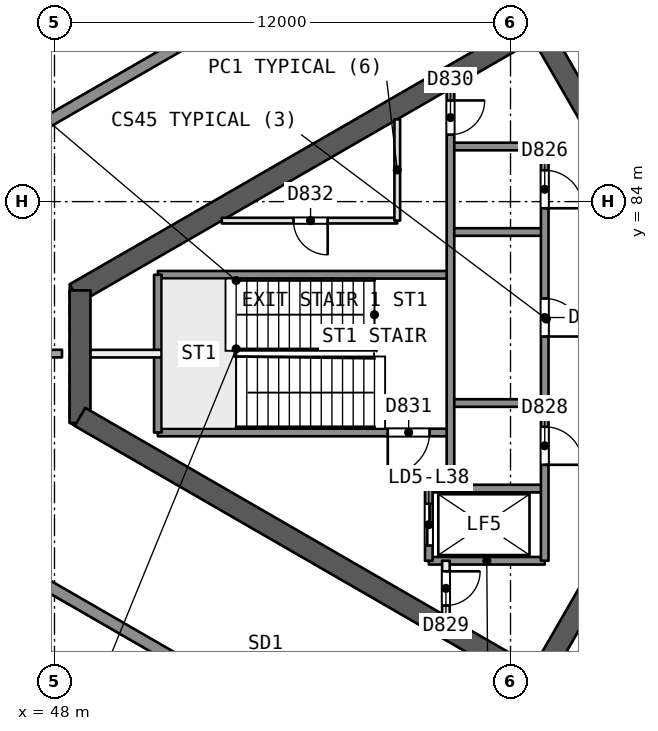
"""IFC4 building model, lengths in metres.
Left out: names, types, materials, properties, quantities, classifications, styles, units other than length and angle.
Written with IfcOpenShell. Run it as: python <this file> out.ifc"""

import sys

from ifc_helpers import new_model, si_unit, direction, frame, frame_2d, origin, place, context, subcontext, project, spatial, rectangle, extrude, element, fill, save


model = new_model("IFC4")
c1 = context("Model", 3, precision=1e-05, world=origin(), true_north=direction((0.0, 1.0)))
c2 = subcontext(c1, "Body", "Model", "MODEL_VIEW")
j1 = project(units=[si_unit("LENGTHUNIT", "METRE"), si_unit("PLANEANGLEUNIT", "RADIAN")], contexts=[c1])
p1 = place(None, origin())
s1 = spatial("IfcSite", under=j1, at=p1, CompositionType="ELEMENT")
p2 = place(p1, origin())
s2 = spatial("IfcBuilding", under=s1, at=p2, CompositionType="ELEMENT")
p3 = place(p2, frame((0.0, 0.0, 160.0)))
s3 = spatial("IfcBuildingStorey", under=s2, at=p3, CompositionType="ELEMENT", Elevation=160.0)
p4 = place(p3, frame((65.682, 80.0, 0.0), z_axis=(0.0, 0.0, 1.0), x_axis=(-0.500000202252, 0.866025287014, 0.0)))
e1 = element("IfcWall", 1, at=p4, inside=s3, PredefinedType="SHEAR", context=c2, shape_type="SweptSolid", body=[
    extrude(rectangle(XDim=10.221, YDim=0.55, at=frame_2d((5.111, 0.0))), origin(), (0.0, 0.0, 1.0), 3.7),
])
p5 = place(p4, frame((0.791, 0.0, 0.0)))
e2 = element("IfcOpeningElement", 2, at=p5, cuts=e1, PredefinedType="OPENING", context=c2, shape_type="SweptSolid", body=[
    extrude(rectangle(XDim=1.2, YDim=2.1, at=frame_2d((0.6, 1.05))), frame((0.0, 0.286, 0.0), z_axis=(0.0, -1.0, 0.0), x_axis=(1.0, 0.0, 0.0)), (0.0, 0.0, 1.0), 0.571),
])
p6 = place(p3, frame((60.709, 88.614, 0.0), z_axis=(0.0, 0.0, 1.0), x_axis=(-0.866020164116, -0.500009075263, 0.0)))
e3 = element("IfcWall", 3, at=p6, inside=s3, PredefinedType="SHEAR", context=c2, shape_type="SweptSolid", body=[
    extrude(rectangle(XDim=14.058, YDim=0.55, at=frame_2d((7.029, 0.0))), origin(), (0.0, 0.0, 1.0), 3.7),
])
p7 = place(p3, frame((48.672, 81.664, 0.0), z_axis=(0.0, 0.0, 1.0), x_axis=(0.0, -1.0, 0.0)))
e4 = element("IfcWall", 4, at=p7, inside=s3, PredefinedType="SHEAR", context=c2, shape_type="SweptSolid", body=[
    extrude(rectangle(XDim=3.487, YDim=0.55, at=frame_2d((1.743, 0.0))), origin(), (0.0, 0.0, 1.0), 3.7),
])
p8 = place(p3, frame((48.672, 78.336, 0.0), z_axis=(0.0, 0.0, 1.0), x_axis=(0.866023530946, -0.500003243837, 0.0)))
e5 = element("IfcWall", 5, at=p8, inside=s3, PredefinedType="SHEAR", context=c2, shape_type="SweptSolid", body=[
    extrude(rectangle(XDim=14.175, YDim=0.55, at=frame_2d((7.087, 0.0))), origin(), (0.0, 0.0, 1.0), 3.7),
])
p9 = place(p3, frame((60.709, 71.386, 0.0), z_axis=(0.0, 0.0, 1.0), x_axis=(0.500015938302, 0.866016201606, 0.0)))
e6 = element("IfcWall", 6, at=p9, inside=s3, PredefinedType="SHEAR", context=c2, shape_type="SweptSolid", body=[
    extrude(rectangle(XDim=10.105, YDim=0.55, at=frame_2d((5.053, 0.0))), origin(), (0.0, 0.0, 1.0), 3.7),
])
p10 = place(p9, frame((7.955, 0.0, 0.0)))
e7 = element("IfcOpeningElement", 7, at=p10, cuts=e6, PredefinedType="OPENING", context=c2, shape_type="SweptSolid", body=[
    extrude(rectangle(XDim=1.2, YDim=2.1, at=frame_2d((0.6, 1.05))), frame((0.0, 0.286, 0.0), z_axis=(0.0, -1.0, 0.0), x_axis=(1.0, 0.0, 0.0)), (0.0, 0.0, 1.0), 0.571),
])
p11 = place(p3, frame((42.208, 80.001, 0.0), z_axis=(0.0, 0.0, 1.0), x_axis=(1.0, 0.0, 0.0)))
e8 = element("IfcWall", 8, at=p11, inside=s3, PredefinedType="PARTITIONING", context=c2, shape_type="SweptSolid", body=[
    extrude(rectangle(XDim=5.99, YDim=0.2, at=frame_2d((2.995, 0.0))), origin(), (0.0, 0.0, 1.0), 3.25),
])
p12 = place(p3, frame((42.059, 82.777, 0.0), z_axis=(0.0, 0.0, 1.0), x_axis=(0.866025745652, 0.499999407868, 0.0)))
e9 = element("IfcWall", 9, at=p12, inside=s3, PredefinedType="SOLIDWALL", context=c2, shape_type="SweptSolid", body=[
    extrude(rectangle(XDim=54.279, YDim=0.3, at=frame_2d((27.14, 0.0))), origin(), (0.0, 0.0, 1.0), 3.25),
])
p13 = place(p12, frame((26.719, 0.0, 0.0)))
e10 = element("IfcOpeningElement", 10, at=p13, cuts=e9, PredefinedType="OPENING", context=c2, shape_type="SweptSolid", body=[
    extrude(rectangle(XDim=2.4, YDim=2.4, at=frame_2d((1.2, 1.2))), frame((0.0, 0.161, 0.0), z_axis=(0.0, -1.0, 0.0), x_axis=(1.0, 0.0, 0.0)), (0.0, 0.0, 1.0), 0.321),
])
p14 = place(p12, frame((31.708, 0.0, 0.0)))
e11 = element("IfcOpeningElement", 11, at=p14, cuts=e9, PredefinedType="OPENING", context=c2, shape_type="SweptSolid", body=[
    extrude(rectangle(XDim=2.4, YDim=2.4, at=frame_2d((1.2, 1.2))), frame((0.0, 0.161, 0.0), z_axis=(0.0, -1.0, 0.0), x_axis=(1.0, 0.0, 0.0)), (0.0, 0.0, 1.0), 0.321),
])
p15 = place(p12, frame((42.175, 0.0, 0.0)))
e12 = element("IfcOpeningElement", 12, at=p15, cuts=e9, PredefinedType="OPENING", context=c2, shape_type="SweptSolid", body=[
    extrude(rectangle(XDim=2.4, YDim=2.4, at=frame_2d((1.2, 1.2))), frame((0.0, 0.161, 0.0), z_axis=(0.0, -1.0, 0.0), x_axis=(1.0, 0.0, 0.0)), (0.0, 0.0, 1.0), 0.321),
])
p16 = place(p12, frame((11.235, 0.0, 0.0)))
e13 = element("IfcOpeningElement", 13, at=p16, cuts=e9, PredefinedType="OPENING", context=c2, shape_type="SweptSolid", body=[
    extrude(rectangle(XDim=2.4, YDim=2.4, at=frame_2d((1.2, 1.2))), frame((0.0, 0.161, 0.0), z_axis=(0.0, -1.0, 0.0), x_axis=(1.0, 0.0, 0.0)), (0.0, 0.0, 1.0), 0.321),
])
p17 = place(p3, frame((89.066, 50.083, 0.0), z_axis=(0.0, 0.0, 1.0), x_axis=(-0.866025745652, 0.499999407868, 0.0)))
e14 = element("IfcWall", 14, at=p17, inside=s3, PredefinedType="SOLIDWALL", context=c2, shape_type="SweptSolid", body=[
    extrude(rectangle(XDim=54.279, YDim=0.3, at=frame_2d((27.14, 0.0))), origin(), (0.0, 0.0, 1.0), 3.25),
])
p18 = place(p17, frame((41.112, 0.0, 0.0)))
e15 = element("IfcOpeningElement", 15, at=p18, cuts=e14, PredefinedType="OPENING", context=c2, shape_type="SweptSolid", body=[
    extrude(rectangle(XDim=2.4, YDim=2.4, at=frame_2d((1.2, 1.2))), frame((0.0, 0.161, 0.0), z_axis=(0.0, -1.0, 0.0), x_axis=(1.0, 0.0, 0.0)), (0.0, 0.0, 1.0), 0.321),
])
p19 = place(p17, frame((11.235, 0.0, 0.0)))
e16 = element("IfcOpeningElement", 16, at=p19, cuts=e14, PredefinedType="OPENING", context=c2, shape_type="SweptSolid", body=[
    extrude(rectangle(XDim=2.4, YDim=2.4, at=frame_2d((1.2, 1.2))), frame((0.0, 0.161, 0.0), z_axis=(0.0, -1.0, 0.0), x_axis=(1.0, 0.0, 0.0)), (0.0, 0.0, 1.0), 0.321),
])
p20 = place(p17, frame((28.032, 0.0, 0.9)))
e17 = element("IfcOpeningElement", 17, at=p20, cuts=e14, PredefinedType="OPENING", context=c2, shape_type="SweptSolid", body=[
    extrude(rectangle(XDim=1.8, YDim=1.5, at=frame_2d((0.9, 0.75))), frame((0.0, 0.161, 0.0), z_axis=(0.0, -1.0, 0.0), x_axis=(1.0, 0.0, 0.0)), (0.0, 0.0, 1.0), 0.321),
])
p21 = place(p17, frame((25.382, 0.0, 0.9)))
e18 = element("IfcOpeningElement", 18, at=p21, cuts=e14, PredefinedType="OPENING", context=c2, shape_type="SweptSolid", body=[
    extrude(rectangle(XDim=1.8, YDim=1.5, at=frame_2d((0.9, 0.75))), frame((0.0, 0.161, 0.0), z_axis=(0.0, -1.0, 0.0), x_axis=(1.0, 0.0, 0.0)), (0.0, 0.0, 1.0), 0.321),
])
p22 = place(p3, frame((60.9, 85.45, 0.0), z_axis=(0.0, 0.0, 1.0), x_axis=(-1.0, 0.0, 0.0)))
e19 = element("IfcWall", 19, at=p22, inside=s3, PredefinedType="SOLIDWALL", context=c2, shape_type="SweptSolid", body=[
    extrude(rectangle(XDim=2.48, YDim=0.2, at=frame_2d((1.24, 0.0))), origin(), (0.0, 0.0, 1.0), 3.25),
])
p23 = place(p3, frame((57.02, 83.5, 0.0), z_axis=(0.0, 0.0, 1.0), x_axis=(-1.0, 0.0, 0.0)))
e20 = element("IfcWall", 20, at=p23, inside=s3, PredefinedType="PARTITIONING", context=c2, shape_type="SweptSolid", body=[
    extrude(rectangle(XDim=4.618, YDim=0.15, at=frame_2d((2.309, 0.0))), origin(), (0.0, 0.0, 1.0), 3.25),
])
p24 = place(p23, frame((1.832, 0.0, 0.0)))
e21 = element("IfcOpeningElement", 21, at=p24, cuts=e20, PredefinedType="OPENING", context=c2, shape_type="SweptSolid", body=[
    extrude(rectangle(XDim=0.9, YDim=2.1, at=frame_2d((0.45, 1.05))), frame((0.0, 0.085, 0.0), z_axis=(0.0, -1.0, 0.0), x_axis=(1.0, 0.0, 0.0)), (0.0, 0.0, 1.0), 0.171),
])
p25 = place(p3, frame((60.9, 83.2, 0.0), z_axis=(0.0, 0.0, 1.0), x_axis=(-1.0, 0.0, 0.0)))
e22 = element("IfcWall", 22, at=p25, inside=s3, PredefinedType="SOLIDWALL", context=c2, shape_type="SweptSolid", body=[
    extrude(rectangle(XDim=2.48, YDim=0.2, at=frame_2d((1.24, 0.0))), origin(), (0.0, 0.0, 1.0), 3.25),
])
p26 = place(p3, frame((58.42, 82.075, 0.0), z_axis=(0.0, 0.0, 1.0), x_axis=(-1.0, 0.0, 0.0)))
e23 = element("IfcWall", 23, at=p26, inside=s3, PredefinedType="SOLIDWALL", context=c2, shape_type="SweptSolid", body=[
    extrude(rectangle(XDim=7.7, YDim=0.2, at=frame_2d((3.85, 0.0))), origin(), (0.0, 0.0, 1.0), 3.25),
])
p27 = place(p3, frame((50.82, 80.0, 0.0), z_axis=(0.0, 0.0, 1.0), x_axis=(-1.0, 0.0, 0.0)))
e24 = element("IfcWall", 24, at=p27, inside=s3, PredefinedType="PARTITIONING", context=c2, shape_type="SweptSolid", body=[
    extrude(rectangle(XDim=1.873, YDim=0.2, at=frame_2d((0.937, 0.0))), origin(), (0.0, 0.0, 1.0), 3.25),
])
p28 = place(p3, frame((60.9, 78.7, 0.0), z_axis=(0.0, 0.0, 1.0), x_axis=(-1.0, 0.0, 0.0)))
e25 = element("IfcWall", 25, at=p28, inside=s3, PredefinedType="SOLIDWALL", context=c2, shape_type="SweptSolid", body=[
    extrude(rectangle(XDim=2.48, YDim=0.2, at=frame_2d((1.24, 0.0))), origin(), (0.0, 0.0, 1.0), 3.25),
])
p29 = place(p3, frame((58.42, 77.925, 0.0), z_axis=(0.0, 0.0, 1.0), x_axis=(-1.0, 0.0, 0.0)))
e26 = element("IfcWall", 26, at=p29, inside=s3, PredefinedType="SOLIDWALL", context=c2, shape_type="SweptSolid", body=[
    extrude(rectangle(XDim=7.7, YDim=0.2, at=frame_2d((3.85, 0.0))), origin(), (0.0, 0.0, 1.0), 3.25),
])
p30 = place(p29, frame((0.55, 0.0, 0.0)))
e27 = element("IfcOpeningElement", 27, at=p30, cuts=e26, PredefinedType="OPENING", context=c2, shape_type="SweptSolid", body=[
    extrude(rectangle(XDim=1.1, YDim=2.1, at=frame_2d((0.55, 1.05))), frame((0.0, 0.11, 0.0), z_axis=(0.0, -1.0, 0.0), x_axis=(1.0, 0.0, 0.0)), (0.0, 0.0, 1.0), 0.221),
])
for number, where, z_axis, x_axis in (
    (28, (60.9, 76.45, 0.0), (0.0, 0.0, 1.0), (-1.0, 0.0, 0.0)),
    (29, (60.9, 74.55, 0.0), (0.0, 0.0, 1.0), (-1.0, 0.0, 0.0)),
):
    element("IfcWall", number, at=place(p3, frame(where, z_axis=z_axis, x_axis=x_axis)), inside=s3, PredefinedType="SOLIDWALL", context=c2, shape_type="SweptSolid", body=[
        extrude(rectangle(XDim=3.05, YDim=0.2, at=frame_2d((1.525, 0.0))), origin(), (0.0, 0.0, 1.0), 3.25),
    ])
p31 = place(p3, frame((60.9, 85.45, 0.0), z_axis=(0.0, 0.0, 1.0), x_axis=(0.0, -1.0, 0.0)))
e30 = element("IfcWall", 30, at=p31, inside=s3, PredefinedType="SOLIDWALL", context=c2, shape_type="SweptSolid", body=[
    extrude(rectangle(XDim=10.9, YDim=0.2, at=frame_2d((5.45, 0.0))), origin(), (0.0, 0.0, 1.0), 3.25),
])
p32 = place(p31, frame((0.625, 0.0, 0.0)))
e31 = element("IfcOpeningElement", 31, at=p32, cuts=e30, PredefinedType="OPENING", context=c2, shape_type="SweptSolid", body=[
    extrude(rectangle(XDim=1.0, YDim=2.1, at=frame_2d((0.5, 1.05))), frame((0.0, 0.11, 0.0), z_axis=(0.0, -1.0, 0.0), x_axis=(1.0, 0.0, 0.0)), (0.0, 0.0, 1.0), 0.221),
])
p33 = place(p31, frame((4.0, 0.0, 0.0)))
e32 = element("IfcOpeningElement", 32, at=p33, cuts=e30, PredefinedType="OPENING", context=c2, shape_type="SweptSolid", body=[
    extrude(rectangle(XDim=1.0, YDim=2.1, at=frame_2d((0.5, 1.05))), frame((0.0, 0.11, 0.0), z_axis=(0.0, -1.0, 0.0), x_axis=(1.0, 0.0, 0.0)), (0.0, 0.0, 1.0), 0.221),
])
p34 = place(p31, frame((7.375, 0.0, 0.0)))
e33 = element("IfcOpeningElement", 33, at=p34, cuts=e30, PredefinedType="OPENING", context=c2, shape_type="SweptSolid", body=[
    extrude(rectangle(XDim=1.0, YDim=2.1, at=frame_2d((0.5, 1.05))), frame((0.0, 0.11, 0.0), z_axis=(0.0, -1.0, 0.0), x_axis=(1.0, 0.0, 0.0)), (0.0, 0.0, 1.0), 0.221),
])
p35 = place(p3, frame((58.42, 86.974, 0.0), z_axis=(0.0, 0.0, 1.0), x_axis=(0.0, -1.0, 0.0)))
e34 = element("IfcWall", 34, at=p35, inside=s3, PredefinedType="SOLIDWALL", context=c2, shape_type="SweptSolid", body=[
    extrude(rectangle(XDim=10.524, YDim=0.2, at=frame_2d((5.262, 0.0))), origin(), (0.0, 0.0, 1.0), 3.25),
])
p36 = place(p35, frame((0.312, 0.0, 0.0)))
e35 = element("IfcOpeningElement", 35, at=p36, cuts=e34, PredefinedType="OPENING", context=c2, shape_type="SweptSolid", body=[
    extrude(rectangle(XDim=0.9, YDim=2.1, at=frame_2d((0.45, 1.05))), frame((0.0, 0.11, 0.0), z_axis=(0.0, -1.0, 0.0), x_axis=(1.0, 0.0, 0.0)), (0.0, 0.0, 1.0), 0.221),
])
p37 = place(p3, frame((58.3, 74.55, 0.0), z_axis=(0.0, 0.0, 1.0), x_axis=(0.0, -1.0, 0.0)))
e36 = element("IfcWall", 36, at=p37, inside=s3, PredefinedType="PARTITIONING", context=c2, shape_type="SweptSolid", body=[
    extrude(rectangle(XDim=1.455, YDim=0.2, at=frame_2d((0.728, 0.0))), origin(), (0.0, 0.0, 1.0), 3.25),
])
p38 = place(p37, frame((0.278, 0.0, 0.0)))
e37 = element("IfcOpeningElement", 37, at=p38, cuts=e36, PredefinedType="OPENING", context=c2, shape_type="SweptSolid", body=[
    extrude(rectangle(XDim=0.9, YDim=2.1, at=frame_2d((0.45, 1.05))), frame((0.0, 0.11, 0.0), z_axis=(0.0, -1.0, 0.0), x_axis=(1.0, 0.0, 0.0)), (0.0, 0.0, 1.0), 0.221),
])
p39 = place(p3, frame((57.85, 76.45, 0.0), z_axis=(0.0, 0.0, 1.0), x_axis=(0.0, -1.0, 0.0)))
e38 = element("IfcWall", 38, at=p39, inside=s3, PredefinedType="SOLIDWALL", context=c2, shape_type="SweptSolid", body=[
    extrude(rectangle(XDim=1.9, YDim=0.2, at=frame_2d((0.95, 0.0))), origin(), (0.0, 0.0, 1.0), 3.25),
])
p40 = place(p39, frame((0.4, 0.0, 0.0)))
e39 = element("IfcOpeningElement", 39, at=p40, cuts=e38, PredefinedType="OPENING", context=c2, shape_type="SweptSolid", body=[
    extrude(rectangle(XDim=1.1, YDim=2.1, at=frame_2d((0.55, 1.05))), frame((0.0, 0.11, 0.0), z_axis=(0.0, -1.0, 0.0), x_axis=(1.0, 0.0, 0.0)), (0.0, 0.0, 1.0), 0.221),
])
p41 = place(p3, frame((57.02, 86.166, 0.0), z_axis=(0.0, 0.0, 1.0), x_axis=(0.0, -1.0, 0.0)))
e40 = element("IfcWall", 40, at=p41, inside=s3, PredefinedType="PARTITIONING", context=c2, shape_type="SweptSolid", body=[
    extrude(rectangle(XDim=2.666, YDim=0.15, at=frame_2d((1.333, 0.0))), origin(), (0.0, 0.0, 1.0), 3.25),
])
p42 = place(p3, frame((50.72, 82.075, 0.0), z_axis=(0.0, 0.0, 1.0), x_axis=(0.0, -1.0, 0.0)))
e41 = element("IfcWall", 41, at=p42, inside=s3, PredefinedType="SOLIDWALL", context=c2, shape_type="SweptSolid", body=[
    extrude(rectangle(XDim=4.15, YDim=0.2, at=frame_2d((2.075, 0.0))), origin(), (0.0, 0.0, 1.0), 3.25),
])
p43 = place(p40, origin())
e42 = element("IfcDoor", 42, at=p43, inside=s3, OperationType="SLIDING_TO_RIGHT", PredefinedType="NOTDEFINED", context=c2, shape_type="SweptSolid", body=[
    extrude(rectangle(XDim=1.1, YDim=2.1, at=frame_2d((0.55, 1.05))), frame((0.0, 0.025, 0.0), z_axis=(0.0, -1.0, 0.0), x_axis=(1.0, 0.0, 0.0)), (0.0, 0.0, 1.0), 0.05),
])
fill(e39, e42)
p44 = place(p32, origin())
e43 = element("IfcDoor", 43, at=p44, inside=s3, OperationType="SINGLE_SWING_RIGHT", PredefinedType="NOTDEFINED", context=c2, shape_type="SweptSolid", body=[
    extrude(rectangle(XDim=1.0, YDim=2.1, at=frame_2d((0.5, 1.05))), frame((0.0, 0.025, 0.0), z_axis=(0.0, -1.0, 0.0), x_axis=(1.0, 0.0, 0.0)), (0.0, 0.0, 1.0), 0.05),
])
fill(e31, e43)
p45 = place(p33, origin())
e44 = element("IfcDoor", 44, at=p45, inside=s3, OperationType="SINGLE_SWING_RIGHT", PredefinedType="NOTDEFINED", context=c2, shape_type="SweptSolid", body=[
    extrude(rectangle(XDim=1.0, YDim=2.1, at=frame_2d((0.5, 1.05))), frame((0.0, 0.025, 0.0), z_axis=(0.0, -1.0, 0.0), x_axis=(1.0, 0.0, 0.0)), (0.0, 0.0, 1.0), 0.05),
])
fill(e32, e44)
p46 = place(p34, origin())
e45 = element("IfcDoor", 45, at=p46, inside=s3, OperationType="SINGLE_SWING_RIGHT", PredefinedType="NOTDEFINED", context=c2, shape_type="SweptSolid", body=[
    extrude(rectangle(XDim=1.0, YDim=2.1, at=frame_2d((0.5, 1.05))), frame((0.0, 0.025, 0.0), z_axis=(0.0, -1.0, 0.0), x_axis=(1.0, 0.0, 0.0)), (0.0, 0.0, 1.0), 0.05),
])
fill(e33, e45)
p47 = place(p38, origin())
e46 = element("IfcDoor", 46, at=p47, inside=s3, OperationType="SINGLE_SWING_LEFT", PredefinedType="NOTDEFINED", context=c2, shape_type="SweptSolid", body=[
    extrude(rectangle(XDim=0.9, YDim=2.1, at=frame_2d((0.45, 1.05))), frame((0.0, 0.025, 0.0), z_axis=(0.0, -1.0, 0.0), x_axis=(1.0, 0.0, 0.0)), (0.0, 0.0, 1.0), 0.05),
])
fill(e37, e46)
p48 = place(p36, origin())
e47 = element("IfcDoor", 47, at=p48, inside=s3, OperationType="SINGLE_SWING_LEFT", PredefinedType="NOTDEFINED", context=c2, shape_type="SweptSolid", body=[
    extrude(rectangle(XDim=0.9, YDim=2.1, at=frame_2d((0.45, 1.05))), frame((0.0, 0.025, 0.0), z_axis=(0.0, -1.0, 0.0), x_axis=(1.0, 0.0, 0.0)), (0.0, 0.0, 1.0), 0.05),
])
fill(e35, e47)
p49 = place(p30, origin())
e48 = element("IfcDoor", 48, at=p49, inside=s3, OperationType="SINGLE_SWING_RIGHT", PredefinedType="NOTDEFINED", context=c2, shape_type="SweptSolid", body=[
    extrude(rectangle(XDim=1.1, YDim=2.1, at=frame_2d((0.55, 1.05))), frame((0.0, 0.025, 0.0), z_axis=(0.0, -1.0, 0.0), x_axis=(1.0, 0.0, 0.0)), (0.0, 0.0, 1.0), 0.05),
])
fill(e27, e48)
p50 = place(p24, origin())
e49 = element("IfcDoor", 49, at=p50, inside=s3, OperationType="SINGLE_SWING_LEFT", PredefinedType="NOTDEFINED", context=c2, shape_type="SweptSolid", body=[
    extrude(rectangle(XDim=0.9, YDim=2.1, at=frame_2d((0.45, 1.05))), frame((0.0, 0.025, 0.0), z_axis=(0.0, -1.0, 0.0), x_axis=(1.0, 0.0, 0.0)), (0.0, 0.0, 1.0), 0.05),
])
fill(e21, e49)
save(model, sys.argv[1])
